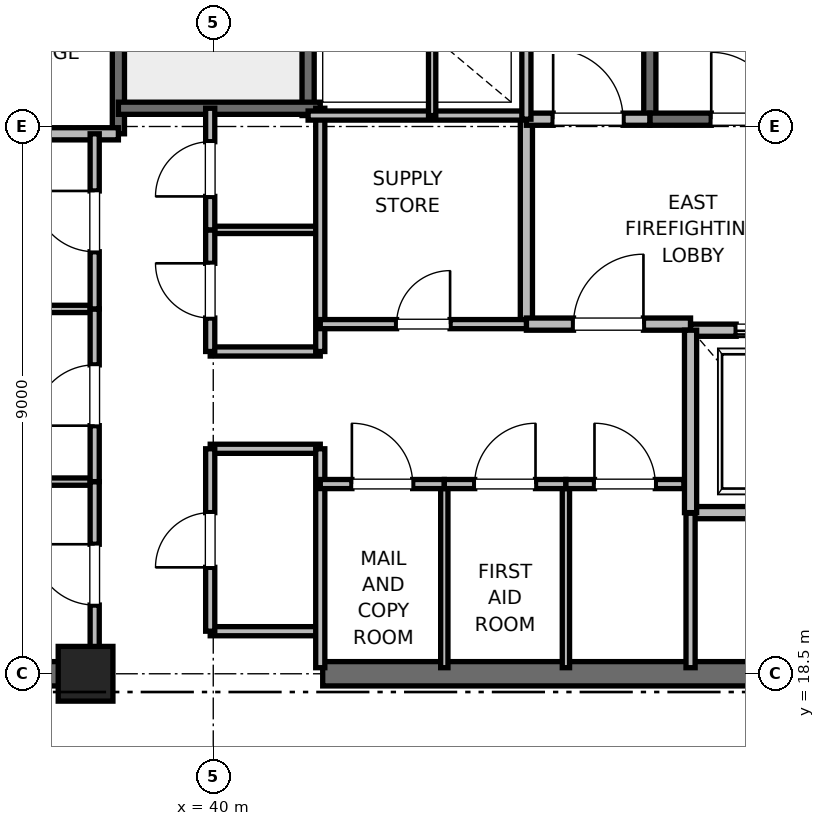
"""IFC4 building model, lengths in metres.
Left out: names, types, materials, properties, quantities, classifications, styles, units other than length and angle.
Written with IfcOpenShell. Run it as: python <this file> out.ifc"""

import sys

from ifc_helpers import new_model, si_unit, direction, frame, frame_2d, origin, origin_2d, place, context, subcontext, project, spatial, rectangle, extrude, element, fill, save


model = new_model("IFC4")
c1 = context("Model", 3, precision=1e-05, world=origin(), true_north=direction((0.0, 1.0)))
c2 = subcontext(c1, "Body", "Model", "MODEL_VIEW")
j1 = project(units=[si_unit("LENGTHUNIT", "METRE"), si_unit("PLANEANGLEUNIT", "RADIAN")], contexts=[c1])
p1 = place(None, origin())
s1 = spatial("IfcSite", under=j1, at=p1, CompositionType="ELEMENT")
p2 = place(p1, origin())
s2 = spatial("IfcBuilding", under=s1, at=p2, CompositionType="ELEMENT")
p3 = place(p2, frame((0.0, 0.0, 318.8)))
s3 = spatial("IfcBuildingStorey", under=s2, at=p3, CompositionType="ELEMENT", Elevation=318.8)
p4 = place(p3, frame((37.9, 18.5, 0.0), z_axis=(0.0, 0.0, 1.0), x_axis=(1.0, 0.0, 0.0)))
e1 = element("IfcColumn", 1, at=p4, inside=s3, PredefinedType="PILASTER", context=c2, shape_type="SweptSolid", body=[
    extrude(rectangle(XDim=0.9, YDim=0.9, at=origin_2d()), origin(), (0.0, 0.0, 1.0), 4.0),
])
for number, where, z_axis, x_axis in (
    (2, (29.0, 18.5, 0.0), (0.0, 0.0, 1.0), (1.0, 0.0, 0.0)),
    (3, (41.8, 18.5, 0.0), (0.0, 0.0, 1.0), (1.0, 0.0, 0.0)),
):
    element("IfcWall", number, at=place(p3, frame(where, z_axis=z_axis, x_axis=x_axis)), inside=s3, PredefinedType="SHEAR", context=c2, shape_type="SweptSolid", body=[
        extrude(rectangle(XDim=9.2, YDim=0.4, at=frame_2d((4.6, 0.0))), origin(), (0.0, 0.0, 1.0), 3.785),
    ])
p5 = place(p3, frame((47.18, 27.62, 0.0), z_axis=(0.0, 0.0, 1.0), x_axis=(0.0, 1.0, 0.0)))
e4 = element("IfcWall", 4, at=p5, inside=s3, PredefinedType="SOLIDWALL", context=c2, shape_type="SweptSolid", body=[
    extrude(rectangle(XDim=8.18, YDim=0.2, at=frame_2d((4.09, 0.0))), origin(), (0.0, 0.0, 1.0), 3.785),
])
p6 = place(p3, frame((47.18, 27.62, 0.0), z_axis=(0.0, 0.0, 1.0), x_axis=(1.0, 0.0, 0.0)))
e5 = element("IfcWall", 5, at=p6, inside=s3, PredefinedType="SOLIDWALL", context=c2, shape_type="SweptSolid", body=[
    extrude(rectangle(XDim=3.12, YDim=0.2, at=frame_2d((1.56, 0.0))), origin(), (0.0, 0.0, 1.0), 3.785),
])
p7 = place(p6, frame((1.01, 0.0, 0.0)))
e6 = element("IfcOpeningElement", 6, at=p7, cuts=e5, PredefinedType="OPENING", context=c2, shape_type="SweptSolid", body=[
    extrude(rectangle(XDim=1.1, YDim=2.15, at=frame_2d((0.55, 1.075))), frame((0.0, 0.1, 0.0), z_axis=(0.0, -1.0, 0.0), x_axis=(1.0, 0.0, 0.0)), (0.0, 0.0, 1.0), 0.2),
])
p8 = place(p3, frame((38.44, 27.38, 0.0), z_axis=(0.0, 0.0, 1.0), x_axis=(0.0, 1.0, 0.0)))
e7 = element("IfcWall", 7, at=p8, inside=s3, PredefinedType="SOLIDWALL", context=c2, shape_type="SweptSolid", body=[
    extrude(rectangle(XDim=8.87, YDim=0.2, at=frame_2d((4.435, 0.0))), origin(), (0.0, 0.0, 1.0), 3.785),
])
p9 = place(p3, frame((41.56, 27.68, 0.0), z_axis=(0.0, 0.0, 1.0), x_axis=(0.0, 1.0, 0.0)))
e8 = element("IfcWall", 8, at=p9, inside=s3, PredefinedType="SOLIDWALL", context=c2, shape_type="SweptSolid", body=[
    extrude(rectangle(XDim=8.57, YDim=0.2, at=frame_2d((4.285, 0.0))), origin(), (0.0, 0.0, 1.0), 3.785),
])
p10 = place(p3, frame((38.44, 27.8, 0.0), z_axis=(0.0, 0.0, 1.0), x_axis=(1.0, 0.0, 0.0)))
e9 = element("IfcWall", 9, at=p10, inside=s3, PredefinedType="SOLIDWALL", context=c2, shape_type="SweptSolid", body=[
    extrude(rectangle(XDim=3.32, YDim=0.2, at=frame_2d((1.66, 0.0))), origin(), (0.0, 0.0, 1.0), 3.785),
])
p11 = place(p3, frame((32.82, 27.38, 0.0), z_axis=(0.0, 0.0, 1.0), x_axis=(1.0, 0.0, 0.0)))
e10 = element("IfcWall", 10, at=p11, inside=s3, PredefinedType="PARTITIONING", context=c2, shape_type="SweptSolid", body=[
    extrude(rectangle(XDim=5.62, YDim=0.2, at=frame_2d((2.81, 0.0))), origin(), (0.0, 0.0, 1.0), 3.785),
])
p12 = place(p3, frame((45.15, 24.25, 0.0), z_axis=(0.0, 0.0, 1.0), x_axis=(0.0, 1.0, 0.0)))
e11 = element("IfcWall", 11, at=p12, inside=s3, PredefinedType="PARTITIONING", context=c2, shape_type="SweptSolid", body=[
    extrude(rectangle(XDim=3.37, YDim=0.2, at=frame_2d((1.685, 0.0))), origin(), (0.0, 0.0, 1.0), 3.785),
])
p13 = place(p3, frame((45.15, 24.25, 0.0), z_axis=(0.0, 0.0, 1.0), x_axis=(1.0, 0.0, 0.0)))
e12 = element("IfcWall", 12, at=p13, inside=s3, PredefinedType="PARTITIONING", context=c2, shape_type="SweptSolid", body=[
    extrude(rectangle(XDim=2.7, YDim=0.2, at=frame_2d((1.35, 0.0))), origin(), (0.0, 0.0, 1.0), 3.785),
])
p14 = place(p13, frame((0.775, 0.0, 0.0)))
e13 = element("IfcOpeningElement", 13, at=p14, cuts=e12, PredefinedType="OPENING", context=c2, shape_type="SweptSolid", body=[
    extrude(rectangle(XDim=1.15, YDim=2.2, at=frame_2d((0.575, 1.1))), frame((0.0, 0.1, 0.0), z_axis=(0.0, -1.0, 0.0), x_axis=(1.0, 0.0, 0.0)), (0.0, 0.0, 1.0), 0.2),
])
p15 = place(p3, frame((45.15, 27.62, 0.0), z_axis=(0.0, 0.0, 1.0), x_axis=(1.0, 0.0, 0.0)))
e14 = element("IfcWall", 14, at=p15, inside=s3, PredefinedType="PARTITIONING", context=c2, shape_type="SweptSolid", body=[
    extrude(rectangle(XDim=2.03, YDim=0.2, at=frame_2d((1.015, 0.0))), origin(), (0.0, 0.0, 1.0), 3.785),
])
p16 = place(p15, frame((0.44, 0.0, 0.0)))
e15 = element("IfcOpeningElement", 15, at=p16, cuts=e14, PredefinedType="OPENING", context=c2, shape_type="SweptSolid", body=[
    extrude(rectangle(XDim=1.15, YDim=2.2, at=frame_2d((0.575, 1.1))), frame((0.0, 0.1, 0.0), z_axis=(0.0, -1.0, 0.0), x_axis=(1.0, 0.0, 0.0)), (0.0, 0.0, 1.0), 0.2),
])
p17 = place(p3, frame((47.85, 21.15, 0.0), z_axis=(0.0, 0.0, 1.0), x_axis=(1.0, 0.0, 0.0)))
e16 = element("IfcWall", 16, at=p17, inside=s3, PredefinedType="SOLIDWALL", context=c2, shape_type="SweptSolid", body=[
    extrude(rectangle(XDim=2.6, YDim=0.2, at=frame_2d((1.3, 0.0))), origin(), (0.0, 0.0, 1.0), 3.785),
])
p18 = place(p3, frame((50.45, 24.15, 0.0), z_axis=(0.0, 0.0, 1.0), x_axis=(-1.0, 0.0, 0.0)))
e17 = element("IfcWall", 17, at=p18, inside=s3, PredefinedType="SOLIDWALL", context=c2, shape_type="SweptSolid", body=[
    extrude(rectangle(XDim=2.6, YDim=0.2, at=frame_2d((1.3, 0.0))), origin(), (0.0, 0.0, 1.0), 2.865),
])
p19 = place(p18, frame((0.75, 0.0, 0.0)))
e18 = element("IfcOpeningElement", 18, at=p19, cuts=e17, PredefinedType="OPENING", context=c2, shape_type="SweptSolid", body=[
    extrude(rectangle(XDim=1.1, YDim=2.2, at=frame_2d((0.55, 1.1))), frame((0.0, 0.1, 0.0), z_axis=(0.0, -1.0, 0.0), x_axis=(1.0, 0.0, 0.0)), (0.0, 0.0, 1.0), 0.2),
])
p20 = place(p3, frame((47.85, 24.15, 0.0), z_axis=(0.0, 0.0, 1.0), x_axis=(0.0, -1.0, 0.0)))
e19 = element("IfcWall", 19, at=p20, inside=s3, PredefinedType="SOLIDWALL", context=c2, shape_type="SweptSolid", body=[
    extrude(rectangle(XDim=3.0, YDim=0.2, at=frame_2d((1.5, 0.0))), origin(), (0.0, 0.0, 1.0), 3.785),
])
for number, where, z_axis, x_axis in (
    (20, (39.95, 19.2, 0.0), (0.0, 0.0, 1.0), (1.0, 0.0, 0.0)),
    (21, (39.95, 22.2, 0.0), (0.0, 0.0, 1.0), (1.0, 0.0, 0.0)),
    (22, (39.95, 23.8, 0.0), (0.0, 0.0, 1.0), (1.0, 0.0, 0.0)),
):
    element("IfcWall", number, at=place(p3, frame(where, z_axis=z_axis, x_axis=x_axis)), inside=s3, PredefinedType="PARTITIONING", context=c2, shape_type="SweptSolid", body=[
        extrude(rectangle(XDim=1.81, YDim=0.15, at=frame_2d((0.905, 0.0))), origin(), (0.0, 0.0, 1.0), 2.85),
    ])
p21 = place(p3, frame((39.95, 25.8, 0.0), z_axis=(0.0, 0.0, 1.0), x_axis=(1.0, 0.0, 0.0)))
e23 = element("IfcWall", 23, at=p21, inside=s3, PredefinedType="PARTITIONING", context=c2, shape_type="SweptSolid", body=[
    extrude(rectangle(XDim=1.81, YDim=0.12, at=frame_2d((0.905, 0.0))), origin(), (0.0, 0.0, 1.0), 2.85),
])
p22 = place(p3, frame((41.76, 18.6, 0.0), z_axis=(0.0, 0.0, 1.0), x_axis=(0.0, 1.0, 0.0)))
e24 = element("IfcWall", 24, at=p22, inside=s3, PredefinedType="PARTITIONING", context=c2, shape_type="SweptSolid", body=[
    extrude(rectangle(XDim=3.6, YDim=0.15, at=frame_2d((1.8, 0.0))), origin(), (0.0, 0.0, 1.0), 2.85),
])
p23 = place(p3, frame((41.76, 23.8, 0.0), z_axis=(0.0, 0.0, 1.0), x_axis=(0.0, 1.0, 0.0)))
e25 = element("IfcWall", 25, at=p23, inside=s3, PredefinedType="PARTITIONING", context=c2, shape_type="SweptSolid", body=[
    extrude(rectangle(XDim=4.0, YDim=0.15, at=frame_2d((2.0, 0.0))), origin(), (0.0, 0.0, 1.0), 2.85),
])
p24 = place(p3, frame((39.95, 19.2, 0.0), z_axis=(0.0, 0.0, 1.0), x_axis=(0.0, 1.0, 0.0)))
e26 = element("IfcWall", 26, at=p24, inside=s3, PredefinedType="PARTITIONING", context=c2, shape_type="SweptSolid", body=[
    extrude(rectangle(XDim=3.0, YDim=0.15, at=frame_2d((1.5, 0.0))), origin(), (0.0, 0.0, 1.0), 2.85),
])
p25 = place(p24, frame((1.05, 0.0, 0.0)))
e27 = element("IfcOpeningElement", 27, at=p25, cuts=e26, PredefinedType="OPENING", context=c2, shape_type="SweptSolid", body=[
    extrude(rectangle(XDim=0.9, YDim=2.1, at=frame_2d((0.45, 1.05))), frame((0.0, 0.075, 0.0), z_axis=(0.0, -1.0, 0.0), x_axis=(1.0, 0.0, 0.0)), (0.0, 0.0, 1.0), 0.15),
])
p26 = place(p3, frame((39.95, 23.8, 0.0), z_axis=(0.0, 0.0, 1.0), x_axis=(0.0, 1.0, 0.0)))
e28 = element("IfcWall", 28, at=p26, inside=s3, PredefinedType="PARTITIONING", context=c2, shape_type="SweptSolid", body=[
    extrude(rectangle(XDim=2.0, YDim=0.15, at=frame_2d((1.0, 0.0))), origin(), (0.0, 0.0, 1.0), 2.85),
])
p27 = place(p26, frame((0.55, 0.0, 0.0)))
e29 = element("IfcOpeningElement", 29, at=p27, cuts=e28, PredefinedType="OPENING", context=c2, shape_type="SweptSolid", body=[
    extrude(rectangle(XDim=0.9, YDim=2.1, at=frame_2d((0.45, 1.05))), frame((0.0, 0.075, 0.0), z_axis=(0.0, -1.0, 0.0), x_axis=(1.0, 0.0, 0.0)), (0.0, 0.0, 1.0), 0.15),
])
p28 = place(p3, frame((39.95, 25.8, 0.0), z_axis=(0.0, 0.0, 1.0), x_axis=(0.0, 1.0, 0.0)))
e30 = element("IfcWall", 30, at=p28, inside=s3, PredefinedType="PARTITIONING", context=c2, shape_type="SweptSolid", body=[
    extrude(rectangle(XDim=2.0, YDim=0.15, at=frame_2d((1.0, 0.0))), origin(), (0.0, 0.0, 1.0), 2.85),
])
p29 = place(p28, frame((0.55, 0.0, 0.0)))
e31 = element("IfcOpeningElement", 31, at=p29, cuts=e30, PredefinedType="OPENING", context=c2, shape_type="SweptSolid", body=[
    extrude(rectangle(XDim=0.9, YDim=2.1, at=frame_2d((0.45, 1.05))), frame((0.0, 0.075, 0.0), z_axis=(0.0, -1.0, 0.0), x_axis=(1.0, 0.0, 0.0)), (0.0, 0.0, 1.0), 0.15),
])
for number, where, z_axis, x_axis in (
    (32, (32.82, 21.66, 0.0), (0.0, 0.0, 1.0), (1.0, 0.0, 0.0)),
    (33, (32.82, 24.5, 0.0), (0.0, 0.0, 1.0), (1.0, 0.0, 0.0)),
):
    element("IfcWall", number, at=place(p3, frame(where, z_axis=z_axis, x_axis=x_axis)), inside=s3, PredefinedType="PARTITIONING", context=c2, shape_type="SweptSolid", body=[
        extrude(rectangle(XDim=5.23, YDim=0.12, at=frame_2d((2.615, 0.0))), origin(), (0.0, 0.0, 1.0), 2.85),
    ])
p30 = place(p3, frame((38.05, 18.6, 0.0), z_axis=(0.0, 0.0, 1.0), x_axis=(0.0, 1.0, 0.0)))
e34 = element("IfcWall", 34, at=p30, inside=s3, PredefinedType="PARTITIONING", context=c2, shape_type="SweptSolid", body=[
    extrude(rectangle(XDim=3.06, YDim=0.15, at=frame_2d((1.53, 0.0))), origin(), (0.0, 0.0, 1.0), 2.85),
])
p31 = place(p30, frame((1.03, 0.0, 0.0)))
e35 = element("IfcOpeningElement", 35, at=p31, cuts=e34, PredefinedType="OPENING", context=c2, shape_type="SweptSolid", body=[
    extrude(rectangle(XDim=1.0, YDim=2.15, at=frame_2d((0.5, 1.075))), frame((0.0, 0.075, 0.0), z_axis=(0.0, -1.0, 0.0), x_axis=(1.0, 0.0, 0.0)), (0.0, 0.0, 1.0), 0.15),
])
p32 = place(p3, frame((38.05, 21.66, 0.0), z_axis=(0.0, 0.0, 1.0), x_axis=(0.0, 1.0, 0.0)))
e36 = element("IfcWall", 36, at=p32, inside=s3, PredefinedType="PARTITIONING", context=c2, shape_type="SweptSolid", body=[
    extrude(rectangle(XDim=2.84, YDim=0.15, at=frame_2d((1.42, 0.0))), origin(), (0.0, 0.0, 1.0), 2.85),
])
p33 = place(p32, frame((0.92, 0.0, 0.0)))
e37 = element("IfcOpeningElement", 37, at=p33, cuts=e36, PredefinedType="OPENING", context=c2, shape_type="SweptSolid", body=[
    extrude(rectangle(XDim=1.0, YDim=2.15, at=frame_2d((0.5, 1.075))), frame((0.0, 0.075, 0.0), z_axis=(0.0, -1.0, 0.0), x_axis=(1.0, 0.0, 0.0)), (0.0, 0.0, 1.0), 0.15),
])
p34 = place(p3, frame((38.05, 24.5, 0.0), z_axis=(0.0, 0.0, 1.0), x_axis=(0.0, 1.0, 0.0)))
e38 = element("IfcWall", 38, at=p34, inside=s3, PredefinedType="PARTITIONING", context=c2, shape_type="SweptSolid", body=[
    extrude(rectangle(XDim=2.88, YDim=0.15, at=frame_2d((1.44, 0.0))), origin(), (0.0, 0.0, 1.0), 2.85),
])
p35 = place(p34, frame((0.94, 0.0, 0.0)))
e39 = element("IfcOpeningElement", 39, at=p35, cuts=e38, PredefinedType="OPENING", context=c2, shape_type="SweptSolid", body=[
    extrude(rectangle(XDim=1.0, YDim=2.15, at=frame_2d((0.5, 1.075))), frame((0.0, 0.075, 0.0), z_axis=(0.0, -1.0, 0.0), x_axis=(1.0, 0.0, 0.0)), (0.0, 0.0, 1.0), 0.15),
])
p36 = place(p3, frame((41.56, 27.68, 0.0), z_axis=(0.0, 0.0, 1.0), x_axis=(1.0, 0.0, 0.0)))
e40 = element("IfcWall", 40, at=p36, inside=s3, PredefinedType="PARTITIONING", context=c2, shape_type="SweptSolid", body=[
    extrude(rectangle(XDim=3.59, YDim=0.15, at=frame_2d((1.795, 0.0))), origin(), (0.0, 0.0, 1.0), 2.85),
])
p37 = place(p3, frame((47.85, 18.6, 0.0), z_axis=(0.0, 0.0, 1.0), x_axis=(0.0, 1.0, 0.0)))
e41 = element("IfcWall", 41, at=p37, inside=s3, PredefinedType="PARTITIONING", context=c2, shape_type="SweptSolid", body=[
    extrude(rectangle(XDim=2.54, YDim=0.15, at=frame_2d((1.27, 0.0))), origin(), (0.0, 0.0, 1.0), 2.85),
])
for number, where, z_axis, x_axis in (
    (42, (43.8, 18.6, 0.0), (0.0, 0.0, 1.0), (0.0, 1.0, 0.0)),
    (43, (45.8, 18.6, 0.0), (0.0, 0.0, 1.0), (0.0, 1.0, 0.0)),
):
    element("IfcWall", number, at=place(p3, frame(where, z_axis=z_axis, x_axis=x_axis)), inside=s3, PredefinedType="PARTITIONING", context=c2, shape_type="SweptSolid", body=[
        extrude(rectangle(XDim=3.02, YDim=0.12, at=frame_2d((1.51, 0.0))), origin(), (0.0, 0.0, 1.0), 2.85),
    ])
p38 = place(p3, frame((41.76, 21.62, 0.0), z_axis=(0.0, 0.0, 1.0), x_axis=(1.0, 0.0, 0.0)))
e44 = element("IfcWall", 44, at=p38, inside=s3, PredefinedType="PARTITIONING", context=c2, shape_type="SweptSolid", body=[
    extrude(rectangle(XDim=2.04, YDim=0.15, at=frame_2d((1.02, 0.0))), origin(), (0.0, 0.0, 1.0), 2.85),
])
p39 = place(p38, frame((0.52, 0.0, 0.0)))
e45 = element("IfcOpeningElement", 45, at=p39, cuts=e44, PredefinedType="OPENING", context=c2, shape_type="SweptSolid", body=[
    extrude(rectangle(XDim=1.0, YDim=2.15, at=frame_2d((0.5, 1.075))), frame((0.0, 0.075, 0.0), z_axis=(0.0, -1.0, 0.0), x_axis=(1.0, 0.0, 0.0)), (0.0, 0.0, 1.0), 0.15),
])
p40 = place(p3, frame((43.8, 21.62, 0.0), z_axis=(0.0, 0.0, 1.0), x_axis=(1.0, 0.0, 0.0)))
e46 = element("IfcWall", 46, at=p40, inside=s3, PredefinedType="PARTITIONING", context=c2, shape_type="SweptSolid", body=[
    extrude(rectangle(XDim=2.0, YDim=0.15, at=frame_2d((1.0, 0.0))), origin(), (0.0, 0.0, 1.0), 2.85),
])
p41 = place(p40, frame((0.5, 0.0, 0.0)))
e47 = element("IfcOpeningElement", 47, at=p41, cuts=e46, PredefinedType="OPENING", context=c2, shape_type="SweptSolid", body=[
    extrude(rectangle(XDim=1.0, YDim=2.15, at=frame_2d((0.5, 1.075))), frame((0.0, 0.075, 0.0), z_axis=(0.0, -1.0, 0.0), x_axis=(1.0, 0.0, 0.0)), (0.0, 0.0, 1.0), 0.15),
])
p42 = place(p3, frame((45.8, 21.62, 0.0), z_axis=(0.0, 0.0, 1.0), x_axis=(1.0, 0.0, 0.0)))
e48 = element("IfcWall", 48, at=p42, inside=s3, PredefinedType="PARTITIONING", context=c2, shape_type="SweptSolid", body=[
    extrude(rectangle(XDim=1.94, YDim=0.15, at=frame_2d((0.97, 0.0))), origin(), (0.0, 0.0, 1.0), 2.85),
])
p43 = place(p42, frame((0.47, 0.0, 0.0)))
e49 = element("IfcOpeningElement", 49, at=p43, cuts=e48, PredefinedType="OPENING", context=c2, shape_type="SweptSolid", body=[
    extrude(rectangle(XDim=1.0, YDim=2.15, at=frame_2d((0.5, 1.075))), frame((0.0, 0.075, 0.0), z_axis=(0.0, -1.0, 0.0), x_axis=(1.0, 0.0, 0.0)), (0.0, 0.0, 1.0), 0.15),
])
p44 = place(p3, frame((41.76, 24.25, 0.0), z_axis=(0.0, 0.0, 1.0), x_axis=(1.0, 0.0, 0.0)))
e50 = element("IfcWall", 50, at=p44, inside=s3, PredefinedType="PARTITIONING", context=c2, shape_type="SweptSolid", body=[
    extrude(rectangle(XDim=3.39, YDim=0.15, at=frame_2d((1.695, 0.0))), origin(), (0.0, 0.0, 1.0), 2.85),
])
p45 = place(p44, frame((1.255, 0.0, 0.0)))
e51 = element("IfcOpeningElement", 51, at=p45, cuts=e50, PredefinedType="OPENING", context=c2, shape_type="SweptSolid", body=[
    extrude(rectangle(XDim=0.88, YDim=2.1, at=frame_2d((0.44, 1.05))), frame((0.0, 0.075, 0.0), z_axis=(0.0, -1.0, 0.0), x_axis=(1.0, 0.0, 0.0)), (0.0, 0.0, 1.0), 0.15),
])
p46 = place(p3, frame((45.15, 27.62, 0.0), z_axis=(0.0, 0.0, 1.0), x_axis=(0.0, 1.0, 0.0)))
e52 = element("IfcWall", 52, at=p46, inside=s3, PredefinedType="PARTITIONING", context=c2, shape_type="SweptSolid", body=[
    extrude(rectangle(XDim=3.1, YDim=0.15, at=frame_2d((1.55, 0.0))), origin(), (0.0, 0.0, 1.0), 2.85),
])
p47 = place(p3, frame((43.6, 27.68, 0.0), z_axis=(0.0, 0.0, 1.0), x_axis=(0.0, 1.0, 0.0)))
e53 = element("IfcWall", 53, at=p47, inside=s3, PredefinedType="PARTITIONING", context=c2, shape_type="SweptSolid", body=[
    extrude(rectangle(XDim=3.04, YDim=0.12, at=frame_2d((1.52, 0.0))), origin(), (0.0, 0.0, 1.0), 2.85),
])
p48 = place(p7, origin())
e54 = element("IfcDoor", 54, at=p48, inside=s3, OperationType="SINGLE_SWING_LEFT", PredefinedType="DOOR", context=c2, shape_type="SweptSolid", body=[
    extrude(rectangle(XDim=1.1, YDim=2.15, at=frame_2d((0.55, 1.075))), frame((0.0, 0.025, 0.0), z_axis=(0.0, -1.0, 0.0), x_axis=(1.0, 0.0, 0.0)), (0.0, 0.0, 1.0), 0.05),
])
fill(e6, e54)
p49 = place(p14, origin())
e55 = element("IfcDoor", 55, at=p49, inside=s3, OperationType="SINGLE_SWING_RIGHT", PredefinedType="DOOR", context=c2, shape_type="SweptSolid", body=[
    extrude(rectangle(XDim=1.15, YDim=2.2, at=frame_2d((0.575, 1.1))), frame((0.0, 0.025, 0.0), z_axis=(0.0, -1.0, 0.0), x_axis=(1.0, 0.0, 0.0)), (0.0, 0.0, 1.0), 0.05),
])
fill(e13, e55)
p50 = place(p16, origin())
e56 = element("IfcDoor", 56, at=p50, inside=s3, OperationType="SINGLE_SWING_LEFT", PredefinedType="DOOR", context=c2, shape_type="SweptSolid", body=[
    extrude(rectangle(XDim=1.15, YDim=2.2, at=frame_2d((0.575, 1.1))), frame((0.0, 0.025, 0.0), z_axis=(0.0, -1.0, 0.0), x_axis=(1.0, 0.0, 0.0)), (0.0, 0.0, 1.0), 0.05),
])
fill(e15, e56)
p51 = place(p19, origin())
e57 = element("IfcDoor", 57, at=p51, inside=s3, OperationType="SLIDING_TO_RIGHT", PredefinedType="DOOR", context=c2, shape_type="SweptSolid", body=[
    extrude(rectangle(XDim=1.1, YDim=2.2, at=frame_2d((0.55, 1.1))), frame((0.0, 0.025, 0.0), z_axis=(0.0, -1.0, 0.0), x_axis=(1.0, 0.0, 0.0)), (0.0, 0.0, 1.0), 0.05),
])
fill(e18, e57)
p52 = place(p25, origin())
e58 = element("IfcDoor", 58, at=p52, inside=s3, OperationType="SINGLE_SWING_LEFT", PredefinedType="DOOR", context=c2, shape_type="SweptSolid", body=[
    extrude(rectangle(XDim=0.9, YDim=2.1, at=frame_2d((0.45, 1.05))), frame((0.0, 0.025, 0.0), z_axis=(0.0, -1.0, 0.0), x_axis=(1.0, 0.0, 0.0)), (0.0, 0.0, 1.0), 0.05),
])
fill(e27, e58)
p53 = place(p27, origin())
e59 = element("IfcDoor", 59, at=p53, inside=s3, OperationType="SINGLE_SWING_RIGHT", PredefinedType="DOOR", context=c2, shape_type="SweptSolid", body=[
    extrude(rectangle(XDim=0.9, YDim=2.1, at=frame_2d((0.45, 1.05))), frame((0.0, 0.025, 0.0), z_axis=(0.0, -1.0, 0.0), x_axis=(1.0, 0.0, 0.0)), (0.0, 0.0, 1.0), 0.05),
])
fill(e29, e59)
p54 = place(p29, origin())
e60 = element("IfcDoor", 60, at=p54, inside=s3, OperationType="SINGLE_SWING_LEFT", PredefinedType="DOOR", context=c2, shape_type="SweptSolid", body=[
    extrude(rectangle(XDim=0.9, YDim=2.1, at=frame_2d((0.45, 1.05))), frame((0.0, 0.025, 0.0), z_axis=(0.0, -1.0, 0.0), x_axis=(1.0, 0.0, 0.0)), (0.0, 0.0, 1.0), 0.05),
])
fill(e31, e60)
p55 = place(p31, origin())
e61 = element("IfcDoor", 61, at=p55, inside=s3, OperationType="SINGLE_SWING_RIGHT", PredefinedType="DOOR", context=c2, shape_type="SweptSolid", body=[
    extrude(rectangle(XDim=1.0, YDim=2.15, at=frame_2d((0.5, 1.075))), frame((0.0, 0.025, 0.0), z_axis=(0.0, -1.0, 0.0), x_axis=(1.0, 0.0, 0.0)), (0.0, 0.0, 1.0), 0.05),
])
fill(e35, e61)
p56 = place(p33, origin())
e62 = element("IfcDoor", 62, at=p56, inside=s3, OperationType="SINGLE_SWING_LEFT", PredefinedType="DOOR", context=c2, shape_type="SweptSolid", body=[
    extrude(rectangle(XDim=1.0, YDim=2.15, at=frame_2d((0.5, 1.075))), frame((0.0, 0.025, 0.0), z_axis=(0.0, -1.0, 0.0), x_axis=(1.0, 0.0, 0.0)), (0.0, 0.0, 1.0), 0.05),
])
fill(e37, e62)
p57 = place(p35, origin())
e63 = element("IfcDoor", 63, at=p57, inside=s3, OperationType="SINGLE_SWING_RIGHT", PredefinedType="DOOR", context=c2, shape_type="SweptSolid", body=[
    extrude(rectangle(XDim=1.0, YDim=2.15, at=frame_2d((0.5, 1.075))), frame((0.0, 0.025, 0.0), z_axis=(0.0, -1.0, 0.0), x_axis=(1.0, 0.0, 0.0)), (0.0, 0.0, 1.0), 0.05),
])
fill(e39, e63)
p58 = place(p39, origin())
e64 = element("IfcDoor", 64, at=p58, inside=s3, OperationType="SINGLE_SWING_LEFT", PredefinedType="DOOR", context=c2, shape_type="SweptSolid", body=[
    extrude(rectangle(XDim=1.0, YDim=2.15, at=frame_2d((0.5, 1.075))), frame((0.0, 0.025, 0.0), z_axis=(0.0, -1.0, 0.0), x_axis=(1.0, 0.0, 0.0)), (0.0, 0.0, 1.0), 0.05),
])
fill(e45, e64)
p59 = place(p41, origin())
e65 = element("IfcDoor", 65, at=p59, inside=s3, OperationType="SINGLE_SWING_RIGHT", PredefinedType="DOOR", context=c2, shape_type="SweptSolid", body=[
    extrude(rectangle(XDim=1.0, YDim=2.15, at=frame_2d((0.5, 1.075))), frame((0.0, 0.025, 0.0), z_axis=(0.0, -1.0, 0.0), x_axis=(1.0, 0.0, 0.0)), (0.0, 0.0, 1.0), 0.05),
])
fill(e47, e65)
p60 = place(p43, origin())
e66 = element("IfcDoor", 66, at=p60, inside=s3, OperationType="SINGLE_SWING_LEFT", PredefinedType="DOOR", context=c2, shape_type="SweptSolid", body=[
    extrude(rectangle(XDim=1.0, YDim=2.15, at=frame_2d((0.5, 1.075))), frame((0.0, 0.025, 0.0), z_axis=(0.0, -1.0, 0.0), x_axis=(1.0, 0.0, 0.0)), (0.0, 0.0, 1.0), 0.05),
])
fill(e49, e66)
p61 = place(p45, origin())
e67 = element("IfcDoor", 67, at=p61, inside=s3, OperationType="SINGLE_SWING_RIGHT", PredefinedType="DOOR", context=c2, shape_type="SweptSolid", body=[
    extrude(rectangle(XDim=0.88, YDim=2.1, at=frame_2d((0.44, 1.05))), frame((0.0, 0.025, 0.0), z_axis=(0.0, -1.0, 0.0), x_axis=(1.0, 0.0, 0.0)), (0.0, 0.0, 1.0), 0.05),
])
fill(e51, e67)
save(model, sys.argv[1])
